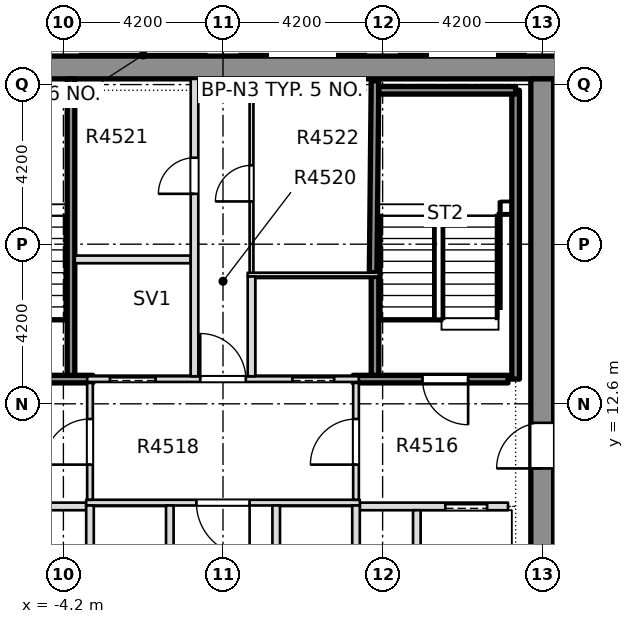
"""IFC4 building model, lengths in metres.
Left out: names, types, materials, properties, quantities, classifications, styles, units other than length and angle.
Written with IfcOpenShell. Run it as: python <this file> out.ifc"""

import sys

from ifc_helpers import new_model, si_unit, direction, frame, frame_2d, origin, place, context, subcontext, project, spatial, rectangle, extrude, element, fill, save


model = new_model("IFC4")
c1 = context("Model", 3, precision=1e-05, world=origin(), true_north=direction((0.0, 1.0)))
c2 = subcontext(c1, "Body", "Model", "MODEL_VIEW")
j1 = project(units=[si_unit("LENGTHUNIT", "METRE"), si_unit("PLANEANGLEUNIT", "RADIAN")], contexts=[c1])
p1 = place(None, origin())
s1 = spatial("IfcSite", under=j1, at=p1, CompositionType="ELEMENT")
p2 = place(p1, origin())
s2 = spatial("IfcBuilding", under=s1, at=p2, CompositionType="ELEMENT")
p3 = place(p2, frame((0.0, 0.0, 175.55)))
s3 = spatial("IfcBuildingStorey", under=s2, at=p3, CompositionType="ELEMENT", Elevation=175.55)
p4 = place(p3, frame((-12.0, 21.45, -0.4), z_axis=(0.0, 0.0, 1.0), x_axis=(1.0, 0.0, 0.0)))
e1 = element("IfcWall", 1, at=p4, inside=s3, PredefinedType="SHEAR", context=c2, shape_type="SweptSolid", body=[
    extrude(rectangle(XDim=24.0, YDim=0.6, at=frame_2d((12.0, 0.0))), origin(), (0.0, 0.0, 1.0), 3.45),
])
p5 = place(p3, frame((8.4, -7.8, -0.4), z_axis=(0.0, 0.0, 1.0), x_axis=(0.0, 1.0, 0.0)))
e2 = element("IfcWall", 2, at=p5, inside=s3, PredefinedType="SHEAR", context=c2, shape_type="SweptSolid", body=[
    extrude(rectangle(XDim=28.95, YDim=0.6, at=frame_2d((14.475, 0.0))), origin(), (0.0, 0.0, 1.0), 3.45),
])
p6 = place(p5, frame((18.7, 0.0, 0.4)))
e3 = element("IfcOpeningElement", 3, at=p6, cuts=e2, PredefinedType="OPENING", context=c2, shape_type="SweptSolid", body=[
    extrude(rectangle(XDim=1.2, YDim=2.1, at=frame_2d((0.6, 1.05))), frame((0.0, 0.31, 0.0), z_axis=(0.0, -1.0, 0.0), x_axis=(1.0, 0.0, 0.0)), (0.0, 0.0, 1.0), 0.62),
])
p7 = place(p3, frame((-7.5, 9.9, 0.0), z_axis=(0.0, 0.0, 1.0), x_axis=(1.0, 0.0, 0.0)))
e4 = element("IfcWall", 4, at=p7, inside=s3, PredefinedType="PARTITIONING", context=c2, shape_type="SweptSolid", body=[
    extrude(rectangle(XDim=3.9, YDim=0.2, at=frame_2d((1.95, 0.0))), origin(), (0.0, 0.0, 1.0), 3.05),
])
p8 = place(p7, frame((0.55, 0.0, 0.0)))
e5 = element("IfcOpeningElement", 5, at=p8, cuts=e4, PredefinedType="OPENING", context=c2, shape_type="SweptSolid", body=[
    extrude(rectangle(XDim=1.1, YDim=2.1, at=frame_2d((0.55, 1.05))), frame((0.0, 0.11, 0.0), z_axis=(0.0, -1.0, 0.0), x_axis=(1.0, 0.0, 0.0)), (0.0, 0.0, 1.0), 0.22),
])
p9 = place(p3, frame((3.6, 9.9, 0.0), z_axis=(0.0, 0.0, 1.0), x_axis=(1.0, 0.0, 0.0)))
e6 = element("IfcWall", 6, at=p9, inside=s3, PredefinedType="PARTITIONING", context=c2, shape_type="SweptSolid", body=[
    extrude(rectangle(XDim=3.9, YDim=0.2, at=frame_2d((1.95, 0.0))), origin(), (0.0, 0.0, 1.0), 3.05),
])
p10 = place(p9, frame((2.25, 0.0, 0.0)))
e7 = element("IfcOpeningElement", 7, at=p10, cuts=e6, PredefinedType="OPENING", context=c2, shape_type="SweptSolid", body=[
    extrude(rectangle(XDim=1.1, YDim=2.1, at=frame_2d((0.55, 1.05))), frame((0.0, 0.11, 0.0), z_axis=(0.0, -1.0, 0.0), x_axis=(1.0, 0.0, 0.0)), (0.0, 0.0, 1.0), 0.22),
])
p11 = place(p3, frame((-3.6, 10.0, 0.0), z_axis=(0.0, 0.0, 1.0), x_axis=(1.0, 0.0, 0.0)))
e8 = element("IfcWall", 8, at=p11, inside=s3, PredefinedType="PARTITIONING", context=c2, shape_type="SweptSolid", body=[
    extrude(rectangle(XDim=7.2, YDim=0.15, at=frame_2d((3.6, 0.0))), origin(), (0.0, 0.0, 1.0), 3.05),
])
p12 = place(p11, frame((2.9, 0.0, 0.0)))
e9 = element("IfcOpeningElement", 9, at=p12, cuts=e8, PredefinedType="OPENING", context=c2, shape_type="SweptSolid", body=[
    extrude(rectangle(XDim=1.4, YDim=2.1, at=frame_2d((0.7, 1.05))), frame((0.0, 0.085, 0.0), z_axis=(0.0, -1.0, 0.0), x_axis=(1.0, 0.0, 0.0)), (0.0, 0.0, 1.0), 0.17),
])
p13 = place(p3, frame((-7.5, 13.25, 0.0), z_axis=(0.0, 0.0, 1.0), x_axis=(1.0, 0.0, 0.0)))
e10 = element("IfcWall", 10, at=p13, inside=s3, PredefinedType="SOLIDWALL", context=c2, shape_type="SweptSolid", body=[
    extrude(rectangle(XDim=4.075, YDim=0.2, at=frame_2d((2.038, 0.0))), origin(), (0.0, 0.0, 1.0), 3.05),
])
p14 = place(p13, frame((1.05, 0.0, 0.0)))
e11 = element("IfcOpeningElement", 11, at=p14, cuts=e10, PredefinedType="OPENING", context=c2, shape_type="SweptSolid", body=[
    extrude(rectangle(XDim=1.2, YDim=2.1, at=frame_2d((0.6, 1.05))), frame((0.0, 0.11, 0.0), z_axis=(0.0, -1.0, 0.0), x_axis=(1.0, 0.0, 0.0)), (0.0, 0.0, 1.0), 0.22),
])
p15 = place(p3, frame((-3.575, 13.25, 0.0), z_axis=(0.0, 0.0, 1.0), x_axis=(1.0, 0.0, 0.0)))
e12 = element("IfcWall", 12, at=p15, inside=s3, PredefinedType="PARTITIONING", context=c2, shape_type="SweptSolid", body=[
    extrude(rectangle(XDim=7.15, YDim=0.15, at=frame_2d((3.575, 0.0))), origin(), (0.0, 0.0, 1.0), 3.05),
])
p16 = place(p15, frame((0.6, 0.0, 0.0)))
e13 = element("IfcOpeningElement", 13, at=p16, cuts=e12, PredefinedType="OPENING", context=c2, shape_type="SweptSolid", body=[
    extrude(rectangle(XDim=1.2, YDim=2.1, at=frame_2d((0.6, 1.05))), frame((0.0, 0.085, 0.0), z_axis=(0.0, -1.0, 0.0), x_axis=(1.0, 0.0, 0.0)), (0.0, 0.0, 1.0), 0.17),
])
p17 = place(p15, frame((5.4, 0.0, 0.0)))
e14 = element("IfcOpeningElement", 14, at=p17, cuts=e12, PredefinedType="OPENING", context=c2, shape_type="SweptSolid", body=[
    extrude(rectangle(XDim=1.1, YDim=2.1, at=frame_2d((0.55, 1.05))), frame((0.0, 0.085, 0.0), z_axis=(0.0, -1.0, 0.0), x_axis=(1.0, 0.0, 0.0)), (0.0, 0.0, 1.0), 0.17),
])
p18 = place(p15, frame((2.975, 0.0, 0.0)))
e15 = element("IfcOpeningElement", 15, at=p18, cuts=e12, PredefinedType="OPENING", context=c2, shape_type="SweptSolid", body=[
    extrude(rectangle(XDim=1.2, YDim=2.1, at=frame_2d((0.6, 1.05))), frame((0.0, 0.085, 0.0), z_axis=(0.0, -1.0, 0.0), x_axis=(1.0, 0.0, 0.0)), (0.0, 0.0, 1.0), 0.17),
])
p19 = place(p3, frame((3.425, 13.25, 0.0), z_axis=(0.0, 0.0, 1.0), x_axis=(1.0, 0.0, 0.0)))
e16 = element("IfcWall", 16, at=p19, inside=s3, PredefinedType="SOLIDWALL", context=c2, shape_type="SweptSolid", body=[
    extrude(rectangle(XDim=4.075, YDim=0.2, at=frame_2d((2.038, 0.0))), origin(), (0.0, 0.0, 1.0), 3.05),
])
p20 = place(p19, frame((1.825, 0.0, 0.0)))
e17 = element("IfcOpeningElement", 17, at=p20, cuts=e16, PredefinedType="OPENING", context=c2, shape_type="SweptSolid", body=[
    extrude(rectangle(XDim=1.2, YDim=2.1, at=frame_2d((0.6, 1.05))), frame((0.0, 0.11, 0.0), z_axis=(0.0, -1.0, 0.0), x_axis=(1.0, 0.0, 0.0)), (0.0, 0.0, 1.0), 0.22),
])
p21 = place(p3, frame((0.65, 16.0, 0.0), z_axis=(0.0, 0.0, 1.0), x_axis=(1.0, 0.0, 0.0)))
e18 = element("IfcWall", 18, at=p21, inside=s3, PredefinedType="PARTITIONING", context=c2, shape_type="SweptSolid", body=[
    extrude(rectangle(XDim=3.45, YDim=0.1, at=frame_2d((1.725, 0.0))), origin(), (0.0, 0.0, 1.0), 3.05),
])
p22 = place(p3, frame((-3.9, 16.4, 0.0), z_axis=(0.0, 0.0, 1.0), x_axis=(1.0, 0.0, 0.0)))
e19 = element("IfcWall", 19, at=p22, inside=s3, PredefinedType="PARTITIONING", context=c2, shape_type="SweptSolid", body=[
    extrude(rectangle(XDim=3.05, YDim=0.2, at=frame_2d((1.525, 0.0))), origin(), (0.0, 0.0, 1.0), 3.05),
])
p23 = place(p3, frame((-4.0, 13.35, 0.0), z_axis=(0.0, 0.0, 1.0), x_axis=(0.0, 1.0, 0.0)))
e20 = element("IfcWall", 20, at=p23, inside=s3, PredefinedType="SOLIDWALL", context=c2, shape_type="SweptSolid", body=[
    extrude(rectangle(XDim=7.799, YDim=0.2, at=frame_2d((3.899, 0.0))), origin(), (0.0, 0.0, 1.0), 3.05),
])
p24 = place(p3, frame((-3.5, 7.075, 0.0), z_axis=(0.0, 0.0, 1.0), x_axis=(0.0, 1.0, 0.0)))
e21 = element("IfcWall", 21, at=p24, inside=s3, PredefinedType="PARTITIONING", context=c2, shape_type="SweptSolid", body=[
    extrude(rectangle(XDim=2.85, YDim=0.2, at=frame_2d((1.425, 0.0))), origin(), (0.0, 0.0, 1.0), 3.05),
])
p25 = place(p3, frame((-3.5, 10.075, 0.0), z_axis=(0.0, 0.0, 1.0), x_axis=(0.0, 1.0, 0.0)))
e22 = element("IfcWall", 22, at=p25, inside=s3, PredefinedType="PARTITIONING", context=c2, shape_type="SweptSolid", body=[
    extrude(rectangle(XDim=3.075, YDim=0.15, at=frame_2d((1.538, 0.0))), origin(), (0.0, 0.0, 1.0), 3.05),
])
p26 = place(p25, frame((0.925, 0.0, 0.0)))
e23 = element("IfcOpeningElement", 23, at=p26, cuts=e22, PredefinedType="OPENING", context=c2, shape_type="SweptSolid", body=[
    extrude(rectangle(XDim=1.2, YDim=2.1, at=frame_2d((0.6, 1.05))), frame((0.0, 0.085, 0.0), z_axis=(0.0, -1.0, 0.0), x_axis=(1.0, 0.0, 0.0)), (0.0, 0.0, 1.0), 0.17),
])
p27 = place(p3, frame((-1.4, 7.075, 0.0), z_axis=(0.0, 0.0, 1.0), x_axis=(0.0, 1.0, 0.0)))
e24 = element("IfcWall", 24, at=p27, inside=s3, PredefinedType="PARTITIONING", context=c2, shape_type="SweptSolid", body=[
    extrude(rectangle(XDim=2.85, YDim=0.2, at=frame_2d((1.425, 0.0))), origin(), (0.0, 0.0, 1.0), 3.05),
])
p28 = place(p3, frame((-0.75, 13.325, 0.0), z_axis=(0.0, 0.0, 1.0), x_axis=(0.0, 1.0, 0.0)))
e25 = element("IfcWall", 25, at=p28, inside=s3, PredefinedType="PARTITIONING", context=c2, shape_type="SweptSolid", body=[
    extrude(rectangle(XDim=7.824, YDim=0.2, at=frame_2d((3.912, 0.0))), origin(), (0.0, 0.0, 1.0), 3.05),
])
p29 = place(p28, frame((4.8, 0.0, 0.0)))
e26 = element("IfcOpeningElement", 26, at=p29, cuts=e25, PredefinedType="OPENING", context=c2, shape_type="SweptSolid", body=[
    extrude(rectangle(XDim=0.95, YDim=2.1, at=frame_2d((0.475, 1.05))), frame((0.0, 0.11, 0.0), z_axis=(0.0, -1.0, 0.0), x_axis=(1.0, 0.0, 0.0)), (0.0, 0.0, 1.0), 0.22),
])
p30 = place(p3, frame((0.75, 13.325, 0.0), z_axis=(0.0, 0.0, 1.0), x_axis=(0.0, 1.0, 0.0)))
e27 = element("IfcWall", 27, at=p30, inside=s3, PredefinedType="PARTITIONING", context=c2, shape_type="SweptSolid", body=[
    extrude(rectangle(XDim=2.625, YDim=0.2, at=frame_2d((1.312, 0.0))), origin(), (0.0, 0.0, 1.0), 3.05),
])
p31 = place(p3, frame((0.75, 16.05, 0.0), z_axis=(0.0, 0.0, 1.0), x_axis=(0.0, 1.0, 0.0)))
e28 = element("IfcWall", 28, at=p31, inside=s3, PredefinedType="PARTITIONING", context=c2, shape_type="SweptSolid", body=[
    extrude(rectangle(XDim=5.099, YDim=0.1, at=frame_2d((2.549, 0.0))), origin(), (0.0, 0.0, 1.0), 3.05),
])
p32 = place(p31, frame((1.875, 0.0, 0.0)))
e29 = element("IfcOpeningElement", 29, at=p32, cuts=e28, PredefinedType="OPENING", context=c2, shape_type="SweptSolid", body=[
    extrude(rectangle(XDim=0.95, YDim=2.1, at=frame_2d((0.475, 1.05))), frame((0.0, 0.06, 0.0), z_axis=(0.0, -1.0, 0.0), x_axis=(1.0, 0.0, 0.0)), (0.0, 0.0, 1.0), 0.12),
])
for number, where, z_axis, x_axis in (
    (30, (1.4, 7.075, 0.0), (0.0, 0.0, 1.0), (0.0, 1.0, 0.0)),
    (31, (3.5, 7.075, 0.0), (0.0, 0.0, 1.0), (0.0, 1.0, 0.0)),
):
    element("IfcWall", number, at=place(p3, frame(where, z_axis=z_axis, x_axis=x_axis)), inside=s3, PredefinedType="PARTITIONING", context=c2, shape_type="SweptSolid", body=[
        extrude(rectangle(XDim=2.85, YDim=0.2, at=frame_2d((1.425, 0.0))), origin(), (0.0, 0.0, 1.0), 3.05),
    ])
p33 = place(p3, frame((3.5, 10.075, 0.0), z_axis=(0.0, 0.0, 1.0), x_axis=(0.0, 1.0, 0.0)))
e32 = element("IfcWall", 32, at=p33, inside=s3, PredefinedType="PARTITIONING", context=c2, shape_type="SweptSolid", body=[
    extrude(rectangle(XDim=3.075, YDim=0.15, at=frame_2d((1.538, 0.0))), origin(), (0.0, 0.0, 1.0), 3.05),
])
p34 = place(p33, frame((0.925, 0.0, 0.0)))
e33 = element("IfcOpeningElement", 33, at=p34, cuts=e32, PredefinedType="OPENING", context=c2, shape_type="SweptSolid", body=[
    extrude(rectangle(XDim=1.2, YDim=2.1, at=frame_2d((0.6, 1.05))), frame((0.0, 0.085, 0.0), z_axis=(0.0, -1.0, 0.0), x_axis=(1.0, 0.0, 0.0)), (0.0, 0.0, 1.0), 0.17),
])
p35 = place(p3, frame((4.0, 13.35, 0.0), z_axis=(0.0, 0.0, 1.0), x_axis=(0.0, 1.0, 0.0)))
e34 = element("IfcWall", 34, at=p35, inside=s3, PredefinedType="SOLIDWALL", context=c2, shape_type="SweptSolid", body=[
    extrude(rectangle(XDim=2.6, YDim=0.2, at=frame_2d((1.3, 0.0))), origin(), (0.0, 0.0, 1.0), 3.05),
])
p36 = place(p3, frame((3.95, 16.05, 0.0), z_axis=(0.0, 0.0, 1.0), x_axis=(0.009911993103, 0.99995087499, 0.0)))
e35 = element("IfcWall", 35, at=p36, inside=s3, PredefinedType="SOLIDWALL", context=c2, shape_type="SweptSolid", body=[
    extrude(rectangle(XDim=5.049, YDim=0.2, at=frame_2d((2.525, 0.0))), origin(), (0.0, 0.0, 1.0), 3.05),
])
p37 = place(p3, frame((5.1, 7.075, 0.0), z_axis=(0.0, 0.0, 1.0), x_axis=(0.0, 1.0, 0.0)))
e36 = element("IfcWall", 36, at=p37, inside=s3, PredefinedType="PARTITIONING", context=c2, shape_type="SweptSolid", body=[
    extrude(rectangle(XDim=2.725, YDim=0.2, at=frame_2d((1.363, 0.0))), origin(), (0.0, 0.0, 1.0), 3.05),
])
p38 = place(p3, frame((-7.7, 20.85, 0.0), z_axis=(0.0, 0.0, 1.0), x_axis=(1.0, 0.0, 0.0)))
e37 = element("IfcWall", 37, at=p38, inside=s3, PredefinedType="SOLIDWALL", context=c2, shape_type="SweptSolid", body=[
    extrude(rectangle(XDim=3.55, YDim=0.2, at=frame_2d((1.775, 0.0))), origin(), (0.0, 0.0, 1.0), 3.05),
])
p39 = place(p3, frame((7.7, 13.25, 0.0), z_axis=(0.0, 0.0, 1.0), x_axis=(0.0, 1.0, 0.0)))
e38 = element("IfcWall", 38, at=p39, inside=s3, PredefinedType="SOLIDWALL", context=c2, shape_type="SweptSolid", body=[
    extrude(rectangle(XDim=7.6, YDim=0.2, at=frame_2d((3.8, 0.0))), origin(), (0.0, 0.0, 1.0), 3.05),
])
p40 = place(p3, frame((4.1, 20.85, 0.0), z_axis=(0.0, 0.0, 1.0), x_axis=(1.0, 0.0, 0.0)))
e39 = element("IfcWall", 39, at=p40, inside=s3, PredefinedType="SOLIDWALL", context=c2, shape_type="SweptSolid", body=[
    extrude(rectangle(XDim=3.6, YDim=0.2, at=frame_2d((1.8, 0.0))), origin(), (0.0, 0.0, 1.0), 3.05),
])
p41 = place(p20, origin())
e40 = element("IfcDoor", 40, at=p41, inside=s3, OperationType="SINGLE_SWING_RIGHT", PredefinedType="DOOR", context=c2, shape_type="SweptSolid", body=[
    extrude(rectangle(XDim=1.2, YDim=2.1, at=frame_2d((0.6, 1.05))), frame((0.0, 0.025, 0.0), z_axis=(0.0, -1.0, 0.0), x_axis=(1.0, 0.0, 0.0)), (0.0, 0.0, 1.0), 0.05),
])
fill(e17, e40)
p42 = place(p10, origin())
e41 = element("IfcDoor", 41, at=p42, inside=s3, OperationType="SLIDING_TO_LEFT", PredefinedType="DOOR", context=c2, shape_type="SweptSolid", body=[
    extrude(rectangle(XDim=1.1, YDim=2.1, at=frame_2d((0.55, 1.05))), frame((0.0, 0.025, 0.0), z_axis=(0.0, -1.0, 0.0), x_axis=(1.0, 0.0, 0.0)), (0.0, 0.0, 1.0), 0.05),
])
fill(e7, e41)
p43 = place(p12, origin())
e42 = element("IfcDoor", 42, at=p43, inside=s3, OperationType="SINGLE_SWING_RIGHT", PredefinedType="DOOR", context=c2, shape_type="SweptSolid", body=[
    extrude(rectangle(XDim=1.4, YDim=2.1, at=frame_2d((0.7, 1.05))), frame((0.0, 0.025, 0.0), z_axis=(0.0, -1.0, 0.0), x_axis=(1.0, 0.0, 0.0)), (0.0, 0.0, 1.0), 0.05),
])
fill(e9, e42)
p44 = place(p16, origin())
e43 = element("IfcDoor", 43, at=p44, inside=s3, OperationType="SLIDING_TO_RIGHT", PredefinedType="DOOR", context=c2, shape_type="SweptSolid", body=[
    extrude(rectangle(XDim=1.2, YDim=2.1, at=frame_2d((0.6, 1.05))), frame((0.0, 0.025, 0.0), z_axis=(0.0, -1.0, 0.0), x_axis=(1.0, 0.0, 0.0)), (0.0, 0.0, 1.0), 0.05),
])
fill(e13, e43)
p45 = place(p17, origin())
e44 = element("IfcDoor", 44, at=p45, inside=s3, OperationType="SLIDING_TO_LEFT", PredefinedType="DOOR", context=c2, shape_type="SweptSolid", body=[
    extrude(rectangle(XDim=1.1, YDim=2.1, at=frame_2d((0.55, 1.05))), frame((0.0, 0.025, 0.0), z_axis=(0.0, -1.0, 0.0), x_axis=(1.0, 0.0, 0.0)), (0.0, 0.0, 1.0), 0.05),
])
fill(e14, e44)
p46 = place(p18, origin())
e45 = element("IfcDoor", 45, at=p46, inside=s3, OperationType="SINGLE_SWING_RIGHT", PredefinedType="DOOR", context=c2, shape_type="SweptSolid", body=[
    extrude(rectangle(XDim=1.2, YDim=2.1, at=frame_2d((0.6, 1.05))), frame((0.0, 0.025, 0.0), z_axis=(0.0, -1.0, 0.0), x_axis=(1.0, 0.0, 0.0)), (0.0, 0.0, 1.0), 0.05),
])
fill(e15, e45)
p47 = place(p29, origin())
e46 = element("IfcDoor", 46, at=p47, inside=s3, OperationType="SINGLE_SWING_RIGHT", PredefinedType="DOOR", context=c2, shape_type="SweptSolid", body=[
    extrude(rectangle(XDim=0.95, YDim=2.1, at=frame_2d((0.475, 1.05))), frame((0.0, 0.025, 0.0), z_axis=(0.0, -1.0, 0.0), x_axis=(1.0, 0.0, 0.0)), (0.0, 0.0, 1.0), 0.05),
])
fill(e26, e46)
p48 = place(p32, origin())
e47 = element("IfcDoor", 47, at=p48, inside=s3, OperationType="SINGLE_SWING_LEFT", PredefinedType="DOOR", context=c2, shape_type="SweptSolid", body=[
    extrude(rectangle(XDim=0.95, YDim=2.1, at=frame_2d((0.475, 1.05))), frame((0.0, 0.025, 0.0), z_axis=(0.0, -1.0, 0.0), x_axis=(1.0, 0.0, 0.0)), (0.0, 0.0, 1.0), 0.05),
])
fill(e29, e47)
p49 = place(p26, origin())
e48 = element("IfcDoor", 48, at=p49, inside=s3, OperationType="SINGLE_SWING_RIGHT", PredefinedType="DOOR", context=c2, shape_type="SweptSolid", body=[
    extrude(rectangle(XDim=1.2, YDim=2.1, at=frame_2d((0.6, 1.05))), frame((0.0, 0.025, 0.0), z_axis=(0.0, -1.0, 0.0), x_axis=(1.0, 0.0, 0.0)), (0.0, 0.0, 1.0), 0.05),
])
fill(e23, e48)
p50 = place(p34, origin())
e49 = element("IfcDoor", 49, at=p50, inside=s3, OperationType="SINGLE_SWING_LEFT", PredefinedType="DOOR", context=c2, shape_type="SweptSolid", body=[
    extrude(rectangle(XDim=1.2, YDim=2.1, at=frame_2d((0.6, 1.05))), frame((0.0, 0.025, 0.0), z_axis=(0.0, -1.0, 0.0), x_axis=(1.0, 0.0, 0.0)), (0.0, 0.0, 1.0), 0.05),
])
fill(e33, e49)
p51 = place(p6, origin())
e50 = element("IfcDoor", 50, at=p51, inside=s3, OperationType="SINGLE_SWING_LEFT", PredefinedType="DOOR", context=c2, shape_type="SweptSolid", body=[
    extrude(rectangle(XDim=1.2, YDim=2.1, at=frame_2d((0.6, 1.05))), frame((0.0, 0.025, 0.0), z_axis=(0.0, -1.0, 0.0), x_axis=(1.0, 0.0, 0.0)), (0.0, 0.0, 1.0), 0.05),
])
fill(e3, e50)
save(model, sys.argv[1])
